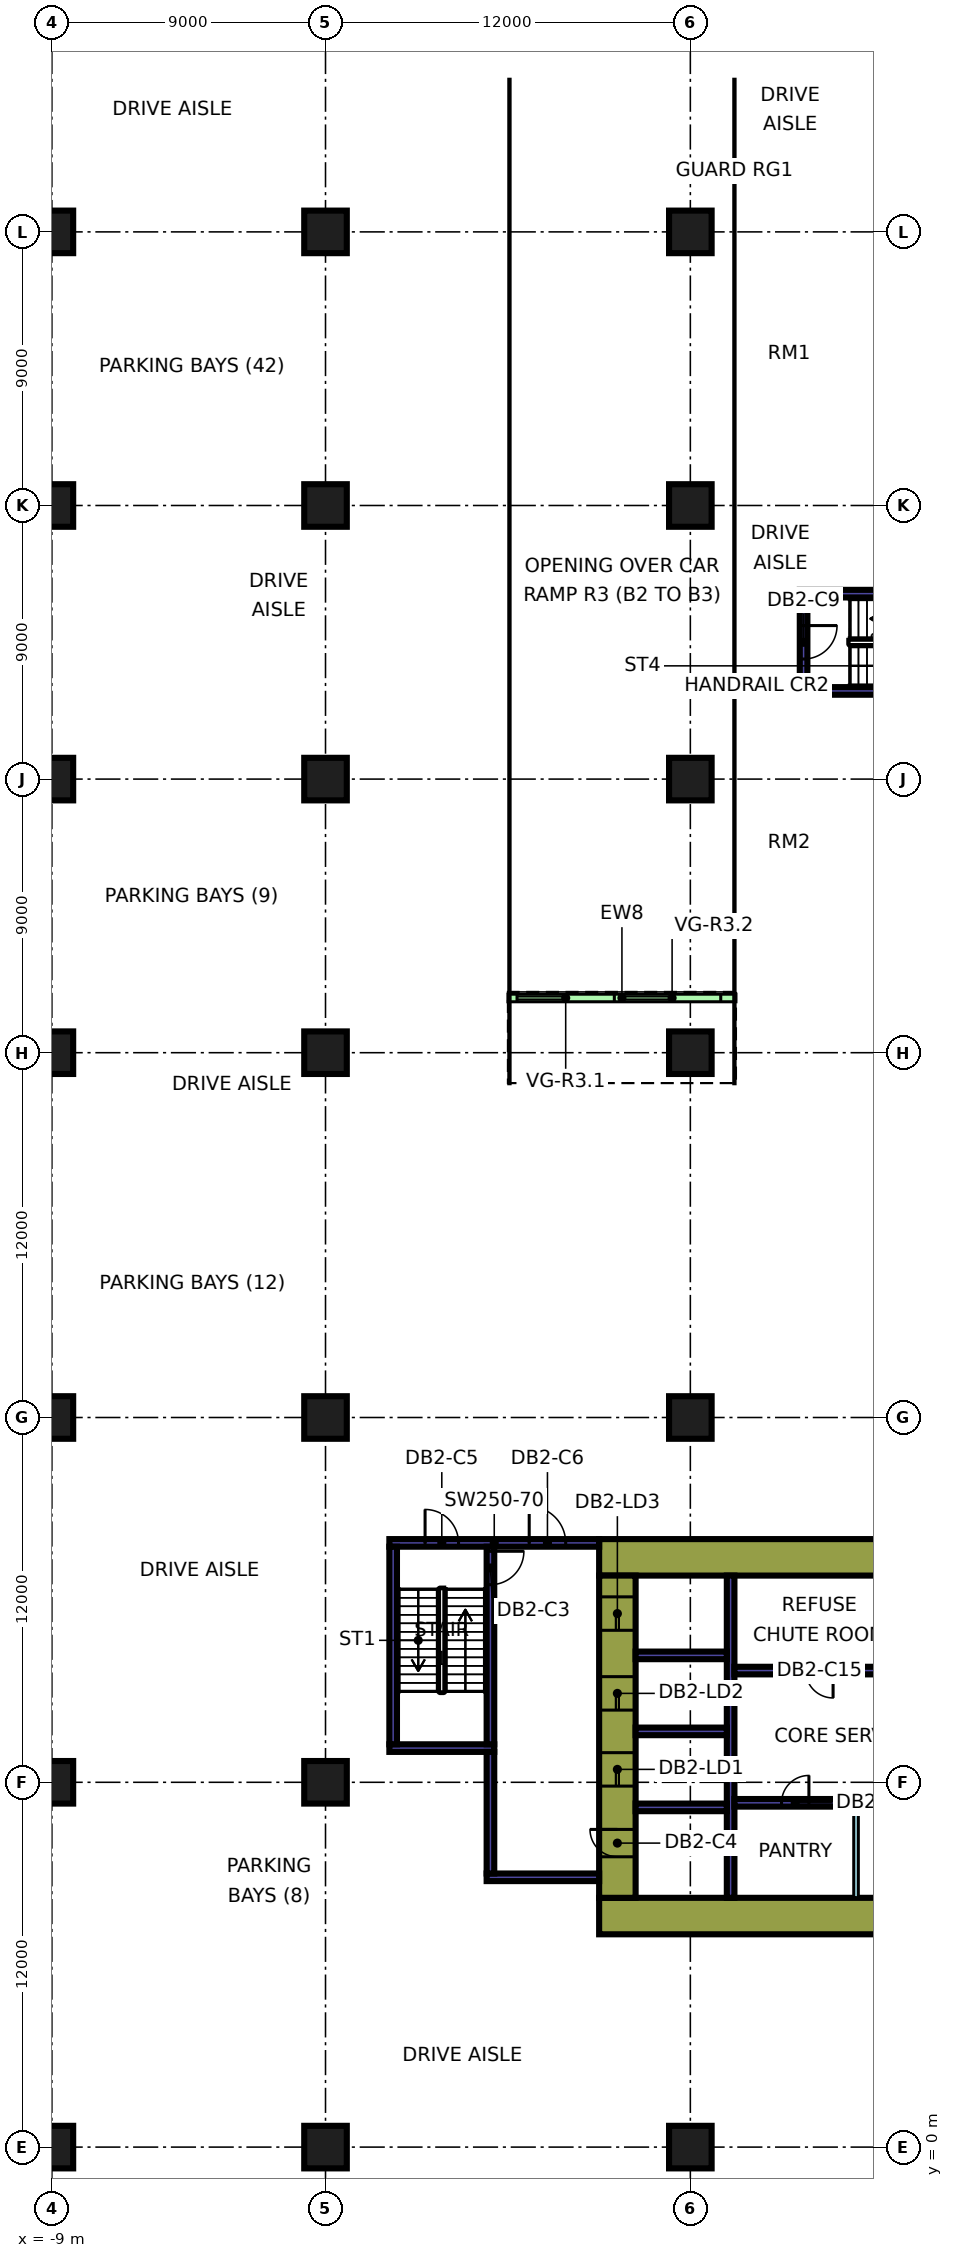
"""IFC4 building model, lengths in metres.
Left out: names, types, materials, properties, quantities, classifications, styles, units other than length and angle.
Written with IfcOpenShell. Run it as: python <this file> out.ifc"""

import sys

from ifc_helpers import new_model, si_unit, direction, frame, frame_2d, origin, origin_2d, place, context, subcontext, project, spatial, rectangle, extrude, element, fill, save


model = new_model("IFC4")
c1 = context("Model", 3, precision=1e-05, world=origin(), true_north=direction((0.0, 1.0)))
c2 = subcontext(c1, "Body", "Model", "MODEL_VIEW")
j1 = project(units=[si_unit("LENGTHUNIT", "METRE"), si_unit("PLANEANGLEUNIT", "RADIAN")], contexts=[c1])
p1 = place(None, origin())
s1 = spatial("IfcSite", under=j1, at=p1, CompositionType="ELEMENT")
p2 = place(p1, origin())
s2 = spatial("IfcBuilding", under=s1, at=p2, CompositionType="ELEMENT")
p3 = place(p2, frame((0.0, 0.0, -9.0)))
s3 = spatial("IfcBuildingStorey", under=s2, at=p3, CompositionType="ELEMENT", Elevation=-9.0)
for number, where, z_axis, x_axis in (
    (1, (-9.0, 0.0, 0.0), (0.0, 0.0, 1.0), (1.0, 0.0, 0.0)),
    (2, (-9.0, 12.0, 0.0), (0.0, 0.0, 1.0), (1.0, 0.0, 0.0)),
    (3, (-9.0, 24.0, 0.0), (0.0, 0.0, 1.0), (1.0, 0.0, 0.0)),
    (4, (-9.0, 36.0, 0.0), (0.0, 0.0, 1.0), (1.0, 0.0, 0.0)),
    (5, (-9.0, 45.0, 0.0), (0.0, 0.0, 1.0), (1.0, 0.0, 0.0)),
    (6, (-9.0, 54.0, 0.0), (0.0, 0.0, 1.0), (1.0, 0.0, 0.0)),
    (7, (-9.0, 63.0, 0.0), (0.0, 0.0, 1.0), (1.0, 0.0, 0.0)),
    (8, (0.0, 0.0, 0.0), (0.0, 0.0, 1.0), (1.0, 0.0, 0.0)),
    (9, (0.0, 12.0, 0.0), (0.0, 0.0, 1.0), (1.0, 0.0, 0.0)),
    (10, (0.0, 24.0, 0.0), (0.0, 0.0, 1.0), (1.0, 0.0, 0.0)),
    (11, (0.0, 36.0, 0.0), (0.0, 0.0, 1.0), (1.0, 0.0, 0.0)),
    (12, (0.0, 45.0, 0.0), (0.0, 0.0, 1.0), (1.0, 0.0, 0.0)),
    (13, (0.0, 54.0, 0.0), (0.0, 0.0, 1.0), (1.0, 0.0, 0.0)),
    (14, (0.0, 63.0, 0.0), (0.0, 0.0, 1.0), (1.0, 0.0, 0.0)),
    (15, (12.0, 0.0, 0.0), (0.0, 0.0, 1.0), (1.0, 0.0, 0.0)),
    (16, (12.0, 24.0, 0.0), (0.0, 0.0, 1.0), (1.0, 0.0, 0.0)),
    (17, (12.0, 36.0, 0.0), (0.0, 0.0, 1.0), (1.0, 0.0, 0.0)),
    (18, (12.0, 45.0, 0.0), (0.0, 0.0, 1.0), (1.0, 0.0, 0.0)),
    (19, (12.0, 54.0, 0.0), (0.0, 0.0, 1.0), (1.0, 0.0, 0.0)),
    (20, (12.0, 63.0, 0.0), (0.0, 0.0, 1.0), (1.0, 0.0, 0.0)),
):
    element("IfcColumn", number, at=place(p3, frame(where, z_axis=z_axis, x_axis=x_axis)), inside=s3, PredefinedType="COLUMN", context=c2, shape_type="SweptSolid", body=[
        extrude(rectangle(XDim=1.4, YDim=1.4, at=origin_2d()), origin(), (0.0, 0.0, 1.0), 4.5),
    ])
p4 = place(p3, frame((9.0, 7.6, 0.0), z_axis=(0.0, 0.0, 1.0), x_axis=(1.0, 0.0, 0.0)))
e21 = element("IfcWall", 21, at=p4, inside=s3, PredefinedType="SHEAR", context=c2, shape_type="SweptSolid", body=[
    extrude(rectangle(XDim=25.0, YDim=1.2, at=frame_2d((12.5, 0.0))), origin(), (0.0, 0.0, 1.0), 4.5),
])
p5 = place(p3, frame((9.0, 19.4, 0.0), z_axis=(0.0, 0.0, 1.0), x_axis=(1.0, 0.0, 0.0)))
e22 = element("IfcWall", 22, at=p5, inside=s3, PredefinedType="SHEAR", context=c2, shape_type="SweptSolid", body=[
    extrude(rectangle(XDim=25.0, YDim=1.2, at=frame_2d((12.5, 0.0))), origin(), (0.0, 0.0, 1.0), 4.5),
])
p6 = place(p5, frame((19.1, 0.0, 0.0)))
e23 = element("IfcOpeningElement", 23, at=p6, cuts=e22, PredefinedType="OPENING", context=c2, shape_type="SweptSolid", body=[
    extrude(rectangle(XDim=1.8, YDim=2.4, at=frame_2d((0.9, 1.2))), frame((0.0, 0.61, 0.0), z_axis=(0.0, -1.0, 0.0), x_axis=(1.0, 0.0, 0.0)), (0.0, 0.0, 1.0), 1.22),
])
p7 = place(p3, frame((9.6, 8.2, 0.0), z_axis=(0.0, 0.0, 1.0), x_axis=(0.0, 1.0, 0.0)))
e24 = element("IfcWall", 24, at=p7, inside=s3, PredefinedType="SHEAR", context=c2, shape_type="SweptSolid", body=[
    extrude(rectangle(XDim=10.6, YDim=1.2, at=frame_2d((5.3, 0.0))), origin(), (0.0, 0.0, 1.0), 4.5),
])
p8 = place(p7, frame((3.675, 0.0, 0.0)))
e25 = element("IfcOpeningElement", 25, at=p8, cuts=e24, PredefinedType="OPENING", context=c2, shape_type="SweptSolid", body=[
    extrude(rectangle(XDim=1.1, YDim=2.2, at=frame_2d((0.55, 1.1))), frame((0.0, 0.61, 0.0), z_axis=(0.0, -1.0, 0.0), x_axis=(1.0, 0.0, 0.0)), (0.0, 0.0, 1.0), 1.22),
])
p9 = place(p7, frame((6.175, 0.0, 0.0)))
e26 = element("IfcOpeningElement", 26, at=p9, cuts=e24, PredefinedType="OPENING", context=c2, shape_type="SweptSolid", body=[
    extrude(rectangle(XDim=1.1, YDim=2.2, at=frame_2d((0.55, 1.1))), frame((0.0, 0.61, 0.0), z_axis=(0.0, -1.0, 0.0), x_axis=(1.0, 0.0, 0.0)), (0.0, 0.0, 1.0), 1.22),
])
p10 = place(p7, frame((8.8, 0.0, 0.0)))
e27 = element("IfcOpeningElement", 27, at=p10, cuts=e24, PredefinedType="OPENING", context=c2, shape_type="SweptSolid", body=[
    extrude(rectangle(XDim=1.1, YDim=2.2, at=frame_2d((0.55, 1.1))), frame((0.0, 0.61, 0.0), z_axis=(0.0, -1.0, 0.0), x_axis=(1.0, 0.0, 0.0)), (0.0, 0.0, 1.0), 1.22),
])
p11 = place(p7, frame((1.35, 0.0, 0.0)))
e28 = element("IfcOpeningElement", 28, at=p11, cuts=e24, PredefinedType="OPENING", context=c2, shape_type="SweptSolid", body=[
    extrude(rectangle(XDim=0.9, YDim=2.1, at=frame_2d((0.45, 1.05))), frame((0.0, 0.61, 0.0), z_axis=(0.0, -1.0, 0.0), x_axis=(1.0, 0.0, 0.0)), (0.0, 0.0, 1.0), 1.22),
])
p12 = place(p3, frame((13.325, 8.2, 0.0), z_axis=(0.0, 0.0, 1.0), x_axis=(0.0, 1.0, 0.0)))
e29 = element("IfcWall", 29, at=p12, inside=s3, PredefinedType="SHEAR", context=c2, shape_type="SweptSolid", body=[
    extrude(rectangle(XDim=10.6, YDim=0.25, at=frame_2d((5.3, 0.0))), origin(), (0.0, 0.0, 1.0), 4.5),
])
p13 = place(p3, frame((13.45, 11.325, 0.0), z_axis=(0.0, 0.0, 1.0), x_axis=(1.0, 0.0, 0.0)))
e30 = element("IfcWall", 30, at=p13, inside=s3, PredefinedType="SHEAR", context=c2, shape_type="SweptSolid", body=[
    extrude(rectangle(XDim=19.35, YDim=0.25, at=frame_2d((9.675, 0.0))), origin(), (0.0, 0.0, 1.0), 4.5),
])
p14 = place(p13, frame((1.55, 0.0, 0.0)))
e31 = element("IfcOpeningElement", 31, at=p14, cuts=e30, PredefinedType="OPENING", context=c2, shape_type="SweptSolid", body=[
    extrude(rectangle(XDim=0.9, YDim=2.1, at=frame_2d((0.45, 1.05))), frame((0.0, 0.135, 0.0), z_axis=(0.0, -1.0, 0.0), x_axis=(1.0, 0.0, 0.0)), (0.0, 0.0, 1.0), 0.27),
])
p15 = place(p13, frame((6.925, 0.0, 0.0)))
e32 = element("IfcOpeningElement", 32, at=p15, cuts=e30, PredefinedType="OPENING", context=c2, shape_type="SweptSolid", body=[
    extrude(rectangle(XDim=0.9, YDim=2.1, at=frame_2d((0.45, 1.05))), frame((0.0, 0.135, 0.0), z_axis=(0.0, -1.0, 0.0), x_axis=(1.0, 0.0, 0.0)), (0.0, 0.0, 1.0), 0.27),
])
p16 = place(p13, frame((14.725, 0.0, 0.0)))
e33 = element("IfcOpeningElement", 33, at=p16, cuts=e30, PredefinedType="OPENING", context=c2, shape_type="SweptSolid", body=[
    extrude(rectangle(XDim=0.9, YDim=2.1, at=frame_2d((0.45, 1.05))), frame((0.0, 0.135, 0.0), z_axis=(0.0, -1.0, 0.0), x_axis=(1.0, 0.0, 0.0)), (0.0, 0.0, 1.0), 0.27),
])
p17 = place(p3, frame((13.45, 15.675, 0.0), z_axis=(0.0, 0.0, 1.0), x_axis=(1.0, 0.0, 0.0)))
e34 = element("IfcWall", 34, at=p17, inside=s3, PredefinedType="SHEAR", context=c2, shape_type="SweptSolid", body=[
    extrude(rectangle(XDim=13.75, YDim=0.25, at=frame_2d((6.875, 0.0))), origin(), (0.0, 0.0, 1.0), 4.5),
])
p18 = place(p17, frame((2.345, 0.0, 0.0)))
e35 = element("IfcOpeningElement", 35, at=p18, cuts=e34, PredefinedType="OPENING", context=c2, shape_type="SweptSolid", body=[
    extrude(rectangle(XDim=0.9, YDim=2.1, at=frame_2d((0.45, 1.05))), frame((0.0, 0.135, 0.0), z_axis=(0.0, -1.0, 0.0), x_axis=(1.0, 0.0, 0.0)), (0.0, 0.0, 1.0), 0.27),
])
p19 = place(p17, frame((7.72, 0.0, 0.0)))
e36 = element("IfcOpeningElement", 36, at=p19, cuts=e34, PredefinedType="OPENING", context=c2, shape_type="SweptSolid", body=[
    extrude(rectangle(XDim=0.9, YDim=2.1, at=frame_2d((0.45, 1.05))), frame((0.0, 0.135, 0.0), z_axis=(0.0, -1.0, 0.0), x_axis=(1.0, 0.0, 0.0)), (0.0, 0.0, 1.0), 0.27),
])
p20 = place(p17, frame((11.8, 0.0, 0.0)))
e37 = element("IfcOpeningElement", 37, at=p20, cuts=e34, PredefinedType="OPENING", context=c2, shape_type="SweptSolid", body=[
    extrude(rectangle(XDim=0.9, YDim=2.1, at=frame_2d((0.45, 1.05))), frame((0.0, 0.135, 0.0), z_axis=(0.0, -1.0, 0.0), x_axis=(1.0, 0.0, 0.0)), (0.0, 0.0, 1.0), 0.27),
])
for number, where, z_axis, x_axis in (
    (38, (10.2, 11.175, 0.0), (0.0, 0.0, 1.0), (1.0, 0.0, 0.0)),
    (39, (10.2, 13.675, 0.0), (0.0, 0.0, 1.0), (1.0, 0.0, 0.0)),
    (40, (10.2, 16.175, 0.0), (0.0, 0.0, 1.0), (1.0, 0.0, 0.0)),
):
    element("IfcWall", number, at=place(p3, frame(where, z_axis=z_axis, x_axis=x_axis)), inside=s3, PredefinedType="SHEAR", context=c2, shape_type="SweptSolid", body=[
        extrude(rectangle(XDim=3.0, YDim=0.25, at=frame_2d((1.5, 0.0))), origin(), (0.0, 0.0, 1.0), 4.5),
    ])
p21 = place(p3, frame((2.1, 19.875, 0.0), z_axis=(0.0, 0.0, 1.0), x_axis=(1.0, 0.0, 0.0)))
e41 = element("IfcWall", 41, at=p21, inside=s3, PredefinedType="SHEAR", context=c2, shape_type="SweptSolid", body=[
    extrude(rectangle(XDim=6.9, YDim=0.25, at=frame_2d((3.45, 0.0))), origin(), (0.0, 0.0, 1.0), 4.5),
])
p22 = place(p21, frame((1.175, 0.0, 0.0)))
e42 = element("IfcOpeningElement", 42, at=p22, cuts=e41, PredefinedType="OPENING", context=c2, shape_type="SweptSolid", body=[
    extrude(rectangle(XDim=1.1, YDim=2.2, at=frame_2d((0.55, 1.1))), frame((0.0, 0.135, 0.0), z_axis=(0.0, -1.0, 0.0), x_axis=(1.0, 0.0, 0.0)), (0.0, 0.0, 1.0), 0.27),
])
p23 = place(p21, frame((4.6, 0.0, 0.0)))
e43 = element("IfcOpeningElement", 43, at=p23, cuts=e41, PredefinedType="OPENING", context=c2, shape_type="SweptSolid", body=[
    extrude(rectangle(XDim=1.2, YDim=2.2, at=frame_2d((0.6, 1.1))), frame((0.0, 0.135, 0.0), z_axis=(0.0, -1.0, 0.0), x_axis=(1.0, 0.0, 0.0)), (0.0, 0.0, 1.0), 0.27),
])
p24 = place(p3, frame((2.1, 13.125, 0.0), z_axis=(0.0, 0.0, 1.0), x_axis=(1.0, 0.0, 0.0)))
e44 = element("IfcWall", 44, at=p24, inside=s3, PredefinedType="SHEAR", context=c2, shape_type="SweptSolid", body=[
    extrude(rectangle(XDim=3.45, YDim=0.25, at=frame_2d((1.725, 0.0))), origin(), (0.0, 0.0, 1.0), 4.5),
])
p25 = place(p3, frame((2.225, 13.25, 0.0), z_axis=(0.0, 0.0, 1.0), x_axis=(0.0, 1.0, 0.0)))
e45 = element("IfcWall", 45, at=p25, inside=s3, PredefinedType="SHEAR", context=c2, shape_type="SweptSolid", body=[
    extrude(rectangle(XDim=6.5, YDim=0.25, at=frame_2d((3.25, 0.0))), origin(), (0.0, 0.0, 1.0), 4.5),
])
p26 = place(p3, frame((5.425, 13.25, 0.0), z_axis=(0.0, 0.0, 1.0), x_axis=(0.0, 1.0, 0.0)))
e46 = element("IfcWall", 46, at=p26, inside=s3, PredefinedType="SHEAR", context=c2, shape_type="SweptSolid", body=[
    extrude(rectangle(XDim=6.5, YDim=0.25, at=frame_2d((3.25, 0.0))), origin(), (0.0, 0.0, 1.0), 4.5),
])
p27 = place(p26, frame((5.25, 0.0, 0.0)))
e47 = element("IfcOpeningElement", 47, at=p27, cuts=e46, PredefinedType="OPENING", context=c2, shape_type="SweptSolid", body=[
    extrude(rectangle(XDim=1.1, YDim=2.2, at=frame_2d((0.55, 1.1))), frame((0.0, 0.135, 0.0), z_axis=(0.0, -1.0, 0.0), x_axis=(1.0, 0.0, 0.0)), (0.0, 0.0, 1.0), 0.27),
])
p28 = place(p3, frame((5.3, 8.875, 0.0), z_axis=(0.0, 0.0, 1.0), x_axis=(1.0, 0.0, 0.0)))
e48 = element("IfcWall", 48, at=p28, inside=s3, PredefinedType="SHEAR", context=c2, shape_type="SweptSolid", body=[
    extrude(rectangle(XDim=3.7, YDim=0.25, at=frame_2d((1.85, 0.0))), origin(), (0.0, 0.0, 1.0), 4.5),
])
p29 = place(p3, frame((5.425, 9.0, 0.0), z_axis=(0.0, 0.0, 1.0), x_axis=(0.0, 1.0, 0.0)))
e49 = element("IfcWall", 49, at=p29, inside=s3, PredefinedType="SHEAR", context=c2, shape_type="SweptSolid", body=[
    extrude(rectangle(XDim=4.0, YDim=0.25, at=frame_2d((2.0, 0.0))), origin(), (0.0, 0.0, 1.0), 4.5),
])
for number, where, z_axis, x_axis in (
    (50, (15.6, 47.9, 0.0), (0.0, 0.0, 1.0), (1.0, 0.0, 0.0)),
    (51, (15.6, 51.1, 0.0), (0.0, 0.0, 1.0), (1.0, 0.0, 0.0)),
):
    element("IfcWall", number, at=place(p3, frame(where, z_axis=z_axis, x_axis=x_axis)), inside=s3, PredefinedType="SHEAR", context=c2, shape_type="SweptSolid", body=[
        extrude(rectangle(XDim=7.0, YDim=0.25, at=frame_2d((3.5, 0.0))), origin(), (0.0, 0.0, 1.0), 4.5),
    ])
p30 = place(p3, frame((15.725, 48.025, 0.0), z_axis=(0.0, 0.0, 1.0), x_axis=(0.0, 1.0, 0.0)))
e52 = element("IfcWall", 52, at=p30, inside=s3, PredefinedType="SHEAR", context=c2, shape_type="SweptSolid", body=[
    extrude(rectangle(XDim=2.95, YDim=0.25, at=frame_2d((1.475, 0.0))), origin(), (0.0, 0.0, 1.0), 4.5),
])
p31 = place(p30, frame((0.925, 0.0, 0.0)))
e53 = element("IfcOpeningElement", 53, at=p31, cuts=e52, PredefinedType="OPENING", context=c2, shape_type="SweptSolid", body=[
    extrude(rectangle(XDim=1.1, YDim=2.2, at=frame_2d((0.55, 1.1))), frame((0.0, 0.135, 0.0), z_axis=(0.0, -1.0, 0.0), x_axis=(1.0, 0.0, 0.0)), (0.0, 0.0, 1.0), 0.27),
])
p32 = place(p3, frame((-20.717, 4.706, 0.0), z_axis=(0.0, 0.0, 1.0), x_axis=(0.707103370229, -0.707110192127, 0.0)))
e54 = element("IfcWall", 54, at=p32, inside=s3, PredefinedType="SOLIDWALL", context=c2, shape_type="SweptSolid", body=[
    extrude(rectangle(XDim=35.788, YDim=0.8, at=frame_2d((17.894, 0.0))), origin(), (0.0, 0.0, 1.0), 4.5),
])
p33 = place(p3, frame((17.45, 8.2, 0.0), z_axis=(0.0, 0.0, 1.0), x_axis=(0.0, 1.0, 0.0)))
e55 = element("IfcWall", 55, at=p33, inside=s3, PredefinedType="PARTITIONING", context=c2, shape_type="SweptSolid", body=[
    extrude(rectangle(XDim=3.0, YDim=0.15, at=frame_2d((1.5, 0.0))), origin(), (0.0, 0.0, 1.0), 4.05),
])
p34 = place(p3, frame((6.0, 37.8, -0.233), z_axis=(0.0, 0.0, 1.0), x_axis=(1.0, 0.0, 0.0)))
e56 = element("IfcWall", 56, at=p34, inside=s3, PredefinedType="SOLIDWALL", context=c2, shape_type="SweptSolid", body=[
    extrude(rectangle(XDim=7.5, YDim=0.25, at=frame_2d((3.75, 0.0))), origin(), (0.0, 0.0, 1.0), 2.7),
])
p35 = place(p34, frame((0.3, 0.0, 0.0)))
e57 = element("IfcOpeningElement", 57, at=p35, cuts=e56, PredefinedType="OPENING", context=c2, shape_type="SweptSolid", body=[
    extrude(rectangle(XDim=3.2, YDim=2.4, at=frame_2d((1.6, 1.2))), frame((0.0, 0.135, 0.0), z_axis=(0.0, -1.0, 0.0), x_axis=(1.0, 0.0, 0.0)), (0.0, 0.0, 1.0), 0.27),
])
p36 = place(p34, frame((3.8, 0.0, 0.0)))
e58 = element("IfcOpeningElement", 58, at=p36, cuts=e56, PredefinedType="OPENING", context=c2, shape_type="SweptSolid", body=[
    extrude(rectangle(XDim=3.2, YDim=2.4, at=frame_2d((1.6, 1.2))), frame((0.0, 0.135, 0.0), z_axis=(0.0, -1.0, 0.0), x_axis=(1.0, 0.0, 0.0)), (0.0, 0.0, 1.0), 0.27),
])
p37 = place(p8, origin())
e59 = element("IfcDoor", 59, at=p37, inside=s3, OperationType="DOUBLE_DOOR_SLIDING", PredefinedType="DOOR", context=c2, shape_type="SweptSolid", body=[
    extrude(rectangle(XDim=1.1, YDim=2.2, at=frame_2d((0.55, 1.1))), frame((0.0, 0.025, 0.0), z_axis=(0.0, -1.0, 0.0), x_axis=(1.0, 0.0, 0.0)), (0.0, 0.0, 1.0), 0.05),
])
fill(e25, e59)
p38 = place(p9, origin())
e60 = element("IfcDoor", 60, at=p38, inside=s3, OperationType="DOUBLE_DOOR_SLIDING", PredefinedType="DOOR", context=c2, shape_type="SweptSolid", body=[
    extrude(rectangle(XDim=1.1, YDim=2.2, at=frame_2d((0.55, 1.1))), frame((0.0, 0.025, 0.0), z_axis=(0.0, -1.0, 0.0), x_axis=(1.0, 0.0, 0.0)), (0.0, 0.0, 1.0), 0.05),
])
fill(e26, e60)
p39 = place(p10, origin())
e61 = element("IfcDoor", 61, at=p39, inside=s3, OperationType="DOUBLE_DOOR_SLIDING", PredefinedType="DOOR", context=c2, shape_type="SweptSolid", body=[
    extrude(rectangle(XDim=1.1, YDim=2.2, at=frame_2d((0.55, 1.1))), frame((0.0, 0.025, 0.0), z_axis=(0.0, -1.0, 0.0), x_axis=(1.0, 0.0, 0.0)), (0.0, 0.0, 1.0), 0.05),
])
fill(e27, e61)
p40 = place(p27, origin())
e62 = element("IfcDoor", 62, at=p40, inside=s3, OperationType="SINGLE_SWING_RIGHT", PredefinedType="DOOR", context=c2, shape_type="SweptSolid", body=[
    extrude(rectangle(XDim=1.1, YDim=2.2, at=frame_2d((0.55, 1.1))), frame((0.0, 0.025, 0.0), z_axis=(0.0, -1.0, 0.0), x_axis=(1.0, 0.0, 0.0)), (0.0, 0.0, 1.0), 0.05),
])
fill(e47, e62)
p41 = place(p11, frame((0.9, 0.0, 0.0), z_axis=(0.0, 0.0, 1.0), x_axis=(-1.0, 0.0, 0.0)))
e63 = element("IfcDoor", 63, at=p41, inside=s3, OperationType="SINGLE_SWING_RIGHT", PredefinedType="DOOR", context=c2, shape_type="SweptSolid", body=[
    extrude(rectangle(XDim=0.9, YDim=2.1, at=frame_2d((0.45, 1.05))), frame((0.0, 0.025, 0.0), z_axis=(0.0, -1.0, 0.0), x_axis=(1.0, 0.0, 0.0)), (0.0, 0.0, 1.0), 0.05),
])
fill(e28, e63)
p42 = place(p22, origin())
e64 = element("IfcDoor", 64, at=p42, inside=s3, OperationType="SINGLE_SWING_LEFT", PredefinedType="DOOR", context=c2, shape_type="SweptSolid", body=[
    extrude(rectangle(XDim=1.1, YDim=2.2, at=frame_2d((0.55, 1.1))), frame((0.0, 0.025, 0.0), z_axis=(0.0, -1.0, 0.0), x_axis=(1.0, 0.0, 0.0)), (0.0, 0.0, 1.0), 0.05),
])
fill(e42, e64)
p43 = place(p23, origin())
e65 = element("IfcDoor", 65, at=p43, inside=s3, OperationType="SINGLE_SWING_LEFT", PredefinedType="DOOR", context=c2, shape_type="SweptSolid", body=[
    extrude(rectangle(XDim=1.2, YDim=2.2, at=frame_2d((0.6, 1.1))), frame((0.0, 0.025, 0.0), z_axis=(0.0, -1.0, 0.0), x_axis=(1.0, 0.0, 0.0)), (0.0, 0.0, 1.0), 0.05),
])
fill(e43, e65)
p44 = place(p31, origin())
e66 = element("IfcDoor", 66, at=p44, inside=s3, OperationType="SINGLE_SWING_RIGHT", PredefinedType="DOOR", context=c2, shape_type="SweptSolid", body=[
    extrude(rectangle(XDim=1.1, YDim=2.2, at=frame_2d((0.55, 1.1))), frame((0.0, 0.025, 0.0), z_axis=(0.0, -1.0, 0.0), x_axis=(1.0, 0.0, 0.0)), (0.0, 0.0, 1.0), 0.05),
])
fill(e53, e66)
p45 = place(p14, frame((0.9, 0.0, 0.0), z_axis=(0.0, 0.0, 1.0), x_axis=(-1.0, 0.0, 0.0)))
e67 = element("IfcDoor", 67, at=p45, inside=s3, OperationType="SINGLE_SWING_RIGHT", PredefinedType="DOOR", context=c2, shape_type="SweptSolid", body=[
    extrude(rectangle(XDim=0.9, YDim=2.1, at=frame_2d((0.45, 1.05))), frame((0.0, 0.025, 0.0), z_axis=(0.0, -1.0, 0.0), x_axis=(1.0, 0.0, 0.0)), (0.0, 0.0, 1.0), 0.05),
])
fill(e31, e67)
p46 = place(p18, origin())
e68 = element("IfcDoor", 68, at=p46, inside=s3, OperationType="SINGLE_SWING_RIGHT", PredefinedType="DOOR", context=c2, shape_type="SweptSolid", body=[
    extrude(rectangle(XDim=0.9, YDim=2.1, at=frame_2d((0.45, 1.05))), frame((0.0, 0.025, 0.0), z_axis=(0.0, -1.0, 0.0), x_axis=(1.0, 0.0, 0.0)), (0.0, 0.0, 1.0), 0.05),
])
fill(e35, e68)
p47 = place(p35, origin())
e69 = element("IfcDoor", 69, at=p47, inside=s3, OperationType="SLIDING_TO_LEFT", PredefinedType="GATE", context=c2, shape_type="SweptSolid", body=[
    extrude(rectangle(XDim=3.2, YDim=2.4, at=frame_2d((1.6, 1.2))), frame((0.0, 0.025, 0.0), z_axis=(0.0, -1.0, 0.0), x_axis=(1.0, 0.0, 0.0)), (0.0, 0.0, 1.0), 0.05),
])
fill(e57, e69)
p48 = place(p36, origin())
e70 = element("IfcDoor", 70, at=p48, inside=s3, OperationType="SLIDING_TO_LEFT", PredefinedType="GATE", context=c2, shape_type="SweptSolid", body=[
    extrude(rectangle(XDim=3.2, YDim=2.4, at=frame_2d((1.6, 1.2))), frame((0.0, 0.025, 0.0), z_axis=(0.0, -1.0, 0.0), x_axis=(1.0, 0.0, 0.0)), (0.0, 0.0, 1.0), 0.05),
])
fill(e58, e70)
save(model, sys.argv[1])
